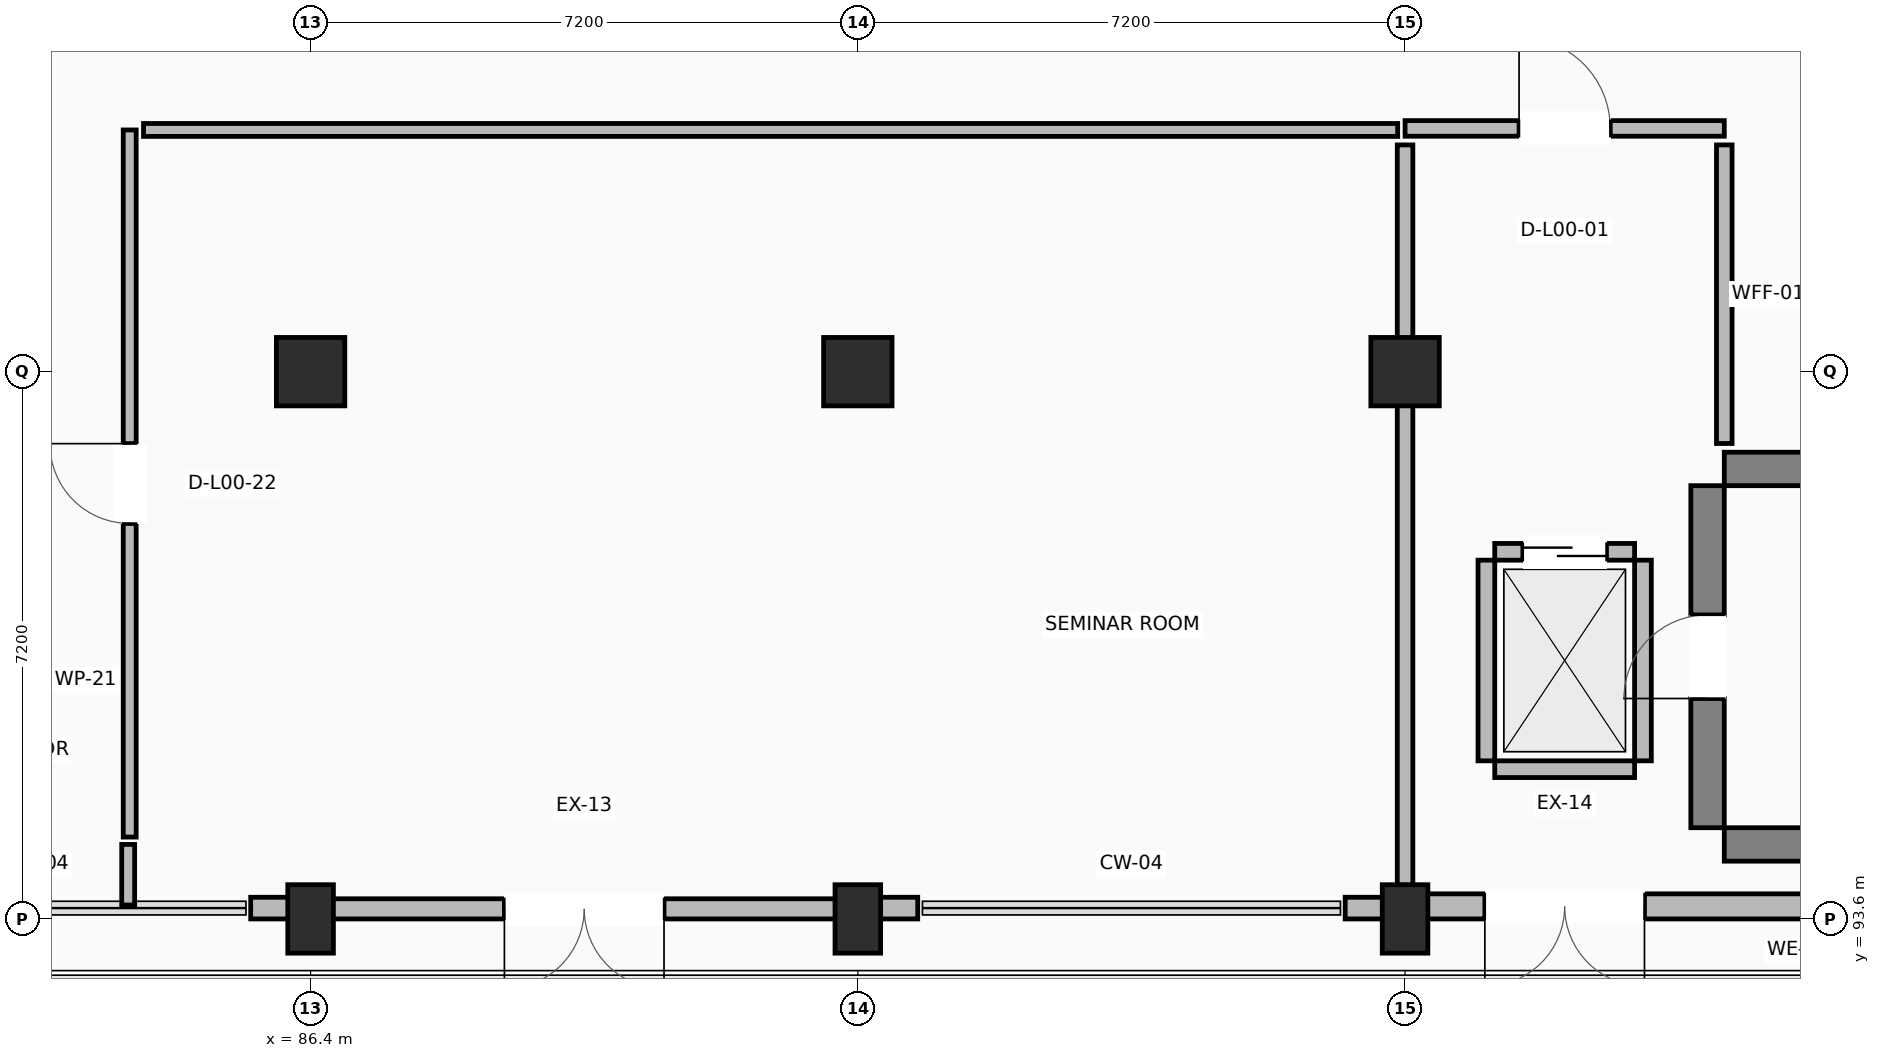
"""IFC4 building model, lengths in metres.
Left out: names, types, materials, properties, quantities, classifications, styles, units other than length and angle.
Written with IfcOpenShell. Run it as: python <this file> out.ifc"""

import sys

from ifc_helpers import new_model, si_unit, direction, frame, frame_2d, origin, origin_2d, place, context, subcontext, project, spatial, rectangle, extrude, element, fill, save


model = new_model("IFC4")
c1 = context("Model", 3, precision=1e-05, world=origin(), true_north=direction((0.0, 1.0)))
c2 = subcontext(c1, "Body", "Model", "MODEL_VIEW")
j1 = project(units=[si_unit("LENGTHUNIT", "METRE"), si_unit("PLANEANGLEUNIT", "RADIAN")], contexts=[c1])
p1 = place(None, origin())
s1 = spatial("IfcSite", under=j1, at=p1, CompositionType="ELEMENT")
p2 = place(p1, origin())
s2 = spatial("IfcBuilding", under=s1, at=p2, CompositionType="ELEMENT")
p3 = place(p2, origin())
s3 = spatial("IfcBuildingStorey", under=s2, at=p3, CompositionType="ELEMENT", Elevation=0.0)
p4 = place(p3, frame((86.4, 93.6, 0.0), z_axis=(0.0, 0.0, 1.0), x_axis=(1.0, 0.0, 0.0)))
e1 = element("IfcColumn", 1, at=p4, inside=s3, PredefinedType="COLUMN", context=c2, shape_type="SweptSolid", body=[
    extrude(rectangle(XDim=0.6, YDim=0.9, at=origin_2d()), origin(), (0.0, 0.0, 1.0), 4.22),
])
p5 = place(p3, frame((86.4, 100.8, 0.0), z_axis=(0.0, 0.0, 1.0), x_axis=(1.0, 0.0, 0.0)))
e2 = element("IfcColumn", 2, at=p5, inside=s3, PredefinedType="COLUMN", context=c2, shape_type="SweptSolid", body=[
    extrude(rectangle(XDim=0.9, YDim=0.9, at=origin_2d()), origin(), (0.0, 0.0, 1.0), 4.22),
])
p6 = place(p3, frame((93.6, 93.6, 0.0), z_axis=(0.0, 0.0, 1.0), x_axis=(1.0, 0.0, 0.0)))
e3 = element("IfcColumn", 3, at=p6, inside=s3, PredefinedType="COLUMN", context=c2, shape_type="SweptSolid", body=[
    extrude(rectangle(XDim=0.6, YDim=0.9, at=origin_2d()), origin(), (0.0, 0.0, 1.0), 4.22),
])
p7 = place(p3, frame((93.6, 100.8, 0.0), z_axis=(0.0, 0.0, 1.0), x_axis=(1.0, 0.0, 0.0)))
e4 = element("IfcColumn", 4, at=p7, inside=s3, PredefinedType="COLUMN", context=c2, shape_type="SweptSolid", body=[
    extrude(rectangle(XDim=0.9, YDim=0.9, at=origin_2d()), origin(), (0.0, 0.0, 1.0), 4.22),
])
p8 = place(p3, frame((100.8, 93.6, 0.0), z_axis=(0.0, 0.0, 1.0), x_axis=(1.0, 0.0, 0.0)))
e5 = element("IfcColumn", 5, at=p8, inside=s3, PredefinedType="COLUMN", context=c2, shape_type="SweptSolid", body=[
    extrude(rectangle(XDim=0.6, YDim=0.9, at=origin_2d()), origin(), (0.0, 0.0, 1.0), 4.22),
])
p9 = place(p3, frame((100.8, 100.8, 0.0), z_axis=(0.0, 0.0, 1.0), x_axis=(1.0, 0.0, 0.0)))
e6 = element("IfcColumn", 6, at=p9, inside=s3, PredefinedType="COLUMN", context=c2, shape_type="SweptSolid", body=[
    extrude(rectangle(XDim=0.9, YDim=0.9, at=origin_2d()), origin(), (0.0, 0.0, 1.0), 4.22),
])
for number, where, z_axis, x_axis in (
    (7, (105.0, 94.58, 0.0), (0.0, 0.0, 1.0), (1.0, 0.0, 0.0)),
    (8, (105.0, 99.52, 0.0), (0.0, 0.0, 1.0), (1.0, 0.0, 0.0)),
):
    element("IfcWall", number, at=place(p3, frame(where, z_axis=z_axis, x_axis=x_axis)), inside=s3, PredefinedType="SHEAR", context=c2, shape_type="SweptSolid", body=[
        extrude(rectangle(XDim=9.5, YDim=0.44, at=frame_2d((4.75, 0.0))), origin(), (0.0, 0.0, 1.0), 4.22),
    ])
p10 = place(p3, frame((104.78, 94.8, 0.0), z_axis=(0.0, 0.0, 1.0), x_axis=(0.0, 1.0, 0.0)))
e9 = element("IfcWall", 9, at=p10, inside=s3, PredefinedType="SHEAR", context=c2, shape_type="SweptSolid", body=[
    extrude(rectangle(XDim=4.5, YDim=0.44, at=frame_2d((2.25, 0.0))), origin(), (0.0, 0.0, 1.0), 4.22),
])
p11 = place(p10, frame((1.7, 0.0, 0.0)))
e10 = element("IfcOpeningElement", 10, at=p11, cuts=e9, PredefinedType="OPENING", context=c2, shape_type="SweptSolid", body=[
    extrude(rectangle(XDim=1.1, YDim=2.15, at=frame_2d((0.55, 1.075))), frame((0.0, 0.23, 0.0), z_axis=(0.0, -1.0, 0.0), x_axis=(1.0, 0.0, 0.0)), (0.0, 0.0, 1.0), 0.46),
])
p12 = place(p3, frame((93.6, 93.732, 0.0), z_axis=(0.0, 0.0, 1.0), x_axis=(-1.0, 0.0, 0.0)))
e11 = element("IfcWall", 11, at=p12, inside=s3, PredefinedType="STANDARD", context=c2, shape_type="SweptSolid", body=[
    extrude(rectangle(XDim=7.2, YDim=0.265, at=frame_2d((3.6, 0.0))), origin(), (0.0, 0.0, 1.0), 2.6),
])
p13 = place(p12, frame((2.55, 0.0, 0.0)))
e12 = element("IfcOpeningElement", 12, at=p13, cuts=e11, PredefinedType="OPENING", context=c2, shape_type="SweptSolid", body=[
    extrude(rectangle(XDim=2.1, YDim=2.3, at=frame_2d((1.05, 1.15))), frame((0.0, 0.142, 0.0), z_axis=(0.0, -1.0, 0.0), x_axis=(1.0, 0.0, 0.0)), (0.0, 0.0, 1.0), 0.285),
])
p14 = place(p3, frame((108.0, 93.765, 0.0), z_axis=(0.0, 0.0, 1.0), x_axis=(-1.0, 0.0, 0.0)))
e13 = element("IfcWall", 13, at=p14, inside=s3, PredefinedType="STANDARD", context=c2, shape_type="SweptSolid", body=[
    extrude(rectangle(XDim=7.2, YDim=0.33, at=frame_2d((3.6, 0.0))), origin(), (0.0, 0.0, 1.0), 2.6),
])
p15 = place(p14, frame((4.05, 0.0, 0.0)))
e14 = element("IfcOpeningElement", 14, at=p15, cuts=e13, PredefinedType="OPENING", context=c2, shape_type="SweptSolid", body=[
    extrude(rectangle(XDim=2.1, YDim=2.3, at=frame_2d((1.05, 1.15))), frame((0.0, 0.175, 0.0), z_axis=(0.0, -1.0, 0.0), x_axis=(1.0, 0.0, 0.0)), (0.0, 0.0, 1.0), 0.35),
])
for number, where, z_axis, x_axis in (
    (15, (85.612, 93.742, 0.0), (0.0, 0.0, 1.0), (1.0, 0.0, 0.0)),
    (16, (93.6, 93.742, 0.0), (0.0, 0.0, 1.0), (1.0, 0.0, 0.0)),
):
    element("IfcWall", number, at=place(p3, frame(where, z_axis=z_axis, x_axis=x_axis)), inside=s3, PredefinedType="STANDARD", context=c2, shape_type="SweptSolid", body=[
        extrude(rectangle(XDim=0.788, YDim=0.285, at=frame_2d((0.394, 0.0))), origin(), (0.0, 0.0, 1.0), 2.6),
    ])
p16 = place(p3, frame((100.012, 93.742, 0.0), z_axis=(0.0, 0.0, 1.0), x_axis=(1.0, 0.0, 0.0)))
e17 = element("IfcWall", 17, at=p16, inside=s3, PredefinedType="STANDARD", context=c2, shape_type="SweptSolid", body=[
    extrude(rectangle(XDim=0.788, YDim=0.285, at=frame_2d((0.394, 0.0))), origin(), (0.0, 0.0, 1.0), 2.6),
])
p17 = place(p3, frame((101.98, 95.57, 0.0), z_axis=(0.0, 0.0, 1.0), x_axis=(1.0, 0.0, 0.0)))
e18 = element("IfcWall", 18, at=p17, inside=s3, PredefinedType="STANDARD", context=c2, shape_type="SweptSolid", body=[
    extrude(rectangle(XDim=1.84, YDim=0.22, at=frame_2d((0.92, 0.0))), origin(), (0.0, 0.0, 1.0), 2.6),
])
p18 = place(p3, frame((101.98, 98.43, 0.0), z_axis=(0.0, 0.0, 1.0), x_axis=(1.0, 0.0, 0.0)))
e19 = element("IfcWall", 19, at=p18, inside=s3, PredefinedType="STANDARD", context=c2, shape_type="SweptSolid", body=[
    extrude(rectangle(XDim=1.84, YDim=0.22, at=frame_2d((0.92, 0.0))), origin(), (0.0, 0.0, 1.0), 2.6),
])
p19 = place(p18, frame((0.37, 0.0, 0.0)))
e20 = element("IfcOpeningElement", 20, at=p19, cuts=e19, PredefinedType="OPENING", context=c2, shape_type="SweptSolid", body=[
    extrude(rectangle(XDim=1.1, YDim=2.15, at=frame_2d((0.55, 1.075))), frame((0.0, 0.12, 0.0), z_axis=(0.0, -1.0, 0.0), x_axis=(1.0, 0.0, 0.0)), (0.0, 0.0, 1.0), 0.24),
])
for number, where, z_axis, x_axis in (
    (21, (101.87, 95.68, 0.0), (0.0, 0.0, 1.0), (0.0, 1.0, 0.0)),
    (22, (103.93, 95.68, 0.0), (0.0, 0.0, 1.0), (0.0, 1.0, 0.0)),
):
    element("IfcWall", number, at=place(p3, frame(where, z_axis=z_axis, x_axis=x_axis)), inside=s3, PredefinedType="STANDARD", context=c2, shape_type="SweptSolid", body=[
        extrude(rectangle(XDim=2.64, YDim=0.22, at=frame_2d((1.32, 0.0))), origin(), (0.0, 0.0, 1.0), 2.6),
    ])
p20 = place(p3, frame((100.8, 104.0, 0.0), z_axis=(0.0, 0.0, 1.0), x_axis=(1.0, 0.0, 0.0)))
e23 = element("IfcWall", 23, at=p20, inside=s3, PredefinedType="PARTITIONING", context=c2, shape_type="SweptSolid", body=[
    extrude(rectangle(XDim=4.2, YDim=0.205, at=frame_2d((2.1, 0.0))), origin(), (0.0, 0.0, 1.0), 2.6),
])
p21 = place(p20, frame((1.5, 0.0, 0.0)))
e24 = element("IfcOpeningElement", 24, at=p21, cuts=e23, PredefinedType="OPENING", context=c2, shape_type="SweptSolid", body=[
    extrude(rectangle(XDim=1.2, YDim=2.15, at=frame_2d((0.6, 1.075))), frame((0.0, 0.113, 0.0), z_axis=(0.0, -1.0, 0.0), x_axis=(1.0, 0.0, 0.0)), (0.0, 0.0, 1.0), 0.225),
])
p22 = place(p3, frame((105.0, 103.783, 0.0), z_axis=(0.0, 0.0, 1.0), x_axis=(0.0, -1.0, 0.0)))
e25 = element("IfcWall", 25, at=p22, inside=s3, PredefinedType="PARTITIONING", context=c2, shape_type="SweptSolid", body=[
    extrude(rectangle(XDim=3.928, YDim=0.205, at=frame_2d((1.964, 0.0))), origin(), (0.0, 0.0, 1.0), 2.6),
])
p23 = place(p3, frame((100.8, 94.045, 0.0), z_axis=(0.0, 0.0, 1.0), x_axis=(0.0, 1.0, 0.0)))
e26 = element("IfcWall", 26, at=p23, inside=s3, PredefinedType="PARTITIONING", context=c2, shape_type="SweptSolid", body=[
    extrude(rectangle(XDim=9.738, YDim=0.205, at=frame_2d((4.869, 0.0))), origin(), (0.0, 0.0, 1.0), 2.6),
])
p24 = place(p3, frame((84.0, 93.783, 0.0), z_axis=(0.0, 0.0, 1.0), x_axis=(0.0, 1.0, 0.0)))
e27 = element("IfcWall", 27, at=p24, inside=s3, PredefinedType="PARTITIONING", context=c2, shape_type="SweptSolid", body=[
    extrude(rectangle(XDim=0.797, YDim=0.17, at=frame_2d((0.398, 0.0))), origin(), (0.0, 0.0, 1.0), 2.6),
])
p25 = place(p3, frame((84.02, 94.677, 0.0), z_axis=(0.0, 0.0, 1.0), x_axis=(0.0, 1.0, 0.0)))
e28 = element("IfcWall", 28, at=p25, inside=s3, PredefinedType="PARTITIONING", context=c2, shape_type="SweptSolid", body=[
    extrude(rectangle(XDim=9.303, YDim=0.17, at=frame_2d((4.651, 0.0))), origin(), (0.0, 0.0, 1.0), 2.6),
])
p26 = place(p25, frame((4.126, 0.0, 0.0)))
e29 = element("IfcOpeningElement", 29, at=p26, cuts=e28, PredefinedType="OPENING", context=c2, shape_type="SweptSolid", body=[
    extrude(rectangle(XDim=1.05, YDim=2.15, at=frame_2d((0.525, 1.075))), frame((0.0, 0.095, 0.0), z_axis=(0.0, -1.0, 0.0), x_axis=(1.0, 0.0, 0.0)), (0.0, 0.0, 1.0), 0.19),
])
p27 = place(p3, frame((84.202, 103.98, 0.0), z_axis=(0.0, 0.0, 1.0), x_axis=(1.0, 0.0, 0.0)))
e30 = element("IfcWall", 30, at=p27, inside=s3, PredefinedType="PARTITIONING", context=c2, shape_type="SweptSolid", body=[
    extrude(rectangle(XDim=16.501, YDim=0.17, at=frame_2d((8.25, 0.0))), origin(), (0.0, 0.0, 1.0), 2.6),
])
p28 = place(p13, origin())
e31 = element("IfcDoor", 31, at=p28, inside=s3, OperationType="DOUBLE_DOOR_SINGLE_SWING", PredefinedType="DOOR", context=c2, shape_type="SweptSolid", body=[
    extrude(rectangle(XDim=2.1, YDim=2.3, at=frame_2d((1.05, 1.15))), frame((0.0, 0.025, 0.0), z_axis=(0.0, -1.0, 0.0), x_axis=(1.0, 0.0, 0.0)), (0.0, 0.0, 1.0), 0.05),
])
fill(e12, e31)
p29 = place(p15, origin())
e32 = element("IfcDoor", 32, at=p29, inside=s3, OperationType="DOUBLE_DOOR_SINGLE_SWING", PredefinedType="DOOR", context=c2, shape_type="SweptSolid", body=[
    extrude(rectangle(XDim=2.1, YDim=2.3, at=frame_2d((1.05, 1.15))), frame((0.0, 0.025, 0.0), z_axis=(0.0, -1.0, 0.0), x_axis=(1.0, 0.0, 0.0)), (0.0, 0.0, 1.0), 0.05),
])
fill(e14, e32)
p30 = place(p11, origin())
e33 = element("IfcDoor", 33, at=p30, inside=s3, OperationType="SINGLE_SWING_LEFT", PredefinedType="DOOR", context=c2, shape_type="SweptSolid", body=[
    extrude(rectangle(XDim=1.1, YDim=2.15, at=frame_2d((0.55, 1.075))), frame((0.0, 0.025, 0.0), z_axis=(0.0, -1.0, 0.0), x_axis=(1.0, 0.0, 0.0)), (0.0, 0.0, 1.0), 0.05),
])
fill(e10, e33)
p31 = place(p19, origin())
e34 = element("IfcDoor", 34, at=p31, inside=s3, OperationType="SLIDING_TO_LEFT", PredefinedType="DOOR", context=c2, shape_type="SweptSolid", body=[
    extrude(rectangle(XDim=1.1, YDim=2.15, at=frame_2d((0.55, 1.075))), frame((0.0, 0.025, 0.0), z_axis=(0.0, -1.0, 0.0), x_axis=(1.0, 0.0, 0.0)), (0.0, 0.0, 1.0), 0.05),
])
fill(e20, e34)
p32 = place(p21, origin())
e35 = element("IfcDoor", 35, at=p32, inside=s3, OperationType="SINGLE_SWING_LEFT", PredefinedType="DOOR", context=c2, shape_type="SweptSolid", body=[
    extrude(rectangle(XDim=1.2, YDim=2.15, at=frame_2d((0.6, 1.075))), frame((0.0, 0.025, 0.0), z_axis=(0.0, -1.0, 0.0), x_axis=(1.0, 0.0, 0.0)), (0.0, 0.0, 1.0), 0.05),
])
fill(e24, e35)
p33 = place(p26, origin())
e36 = element("IfcDoor", 36, at=p33, inside=s3, OperationType="SINGLE_SWING_RIGHT", PredefinedType="DOOR", context=c2, shape_type="SweptSolid", body=[
    extrude(rectangle(XDim=1.05, YDim=2.15, at=frame_2d((0.525, 1.075))), frame((0.0, 0.025, 0.0), z_axis=(0.0, -1.0, 0.0), x_axis=(1.0, 0.0, 0.0)), (0.0, 0.0, 1.0), 0.05),
])
fill(e29, e36)
save(model, sys.argv[1])
